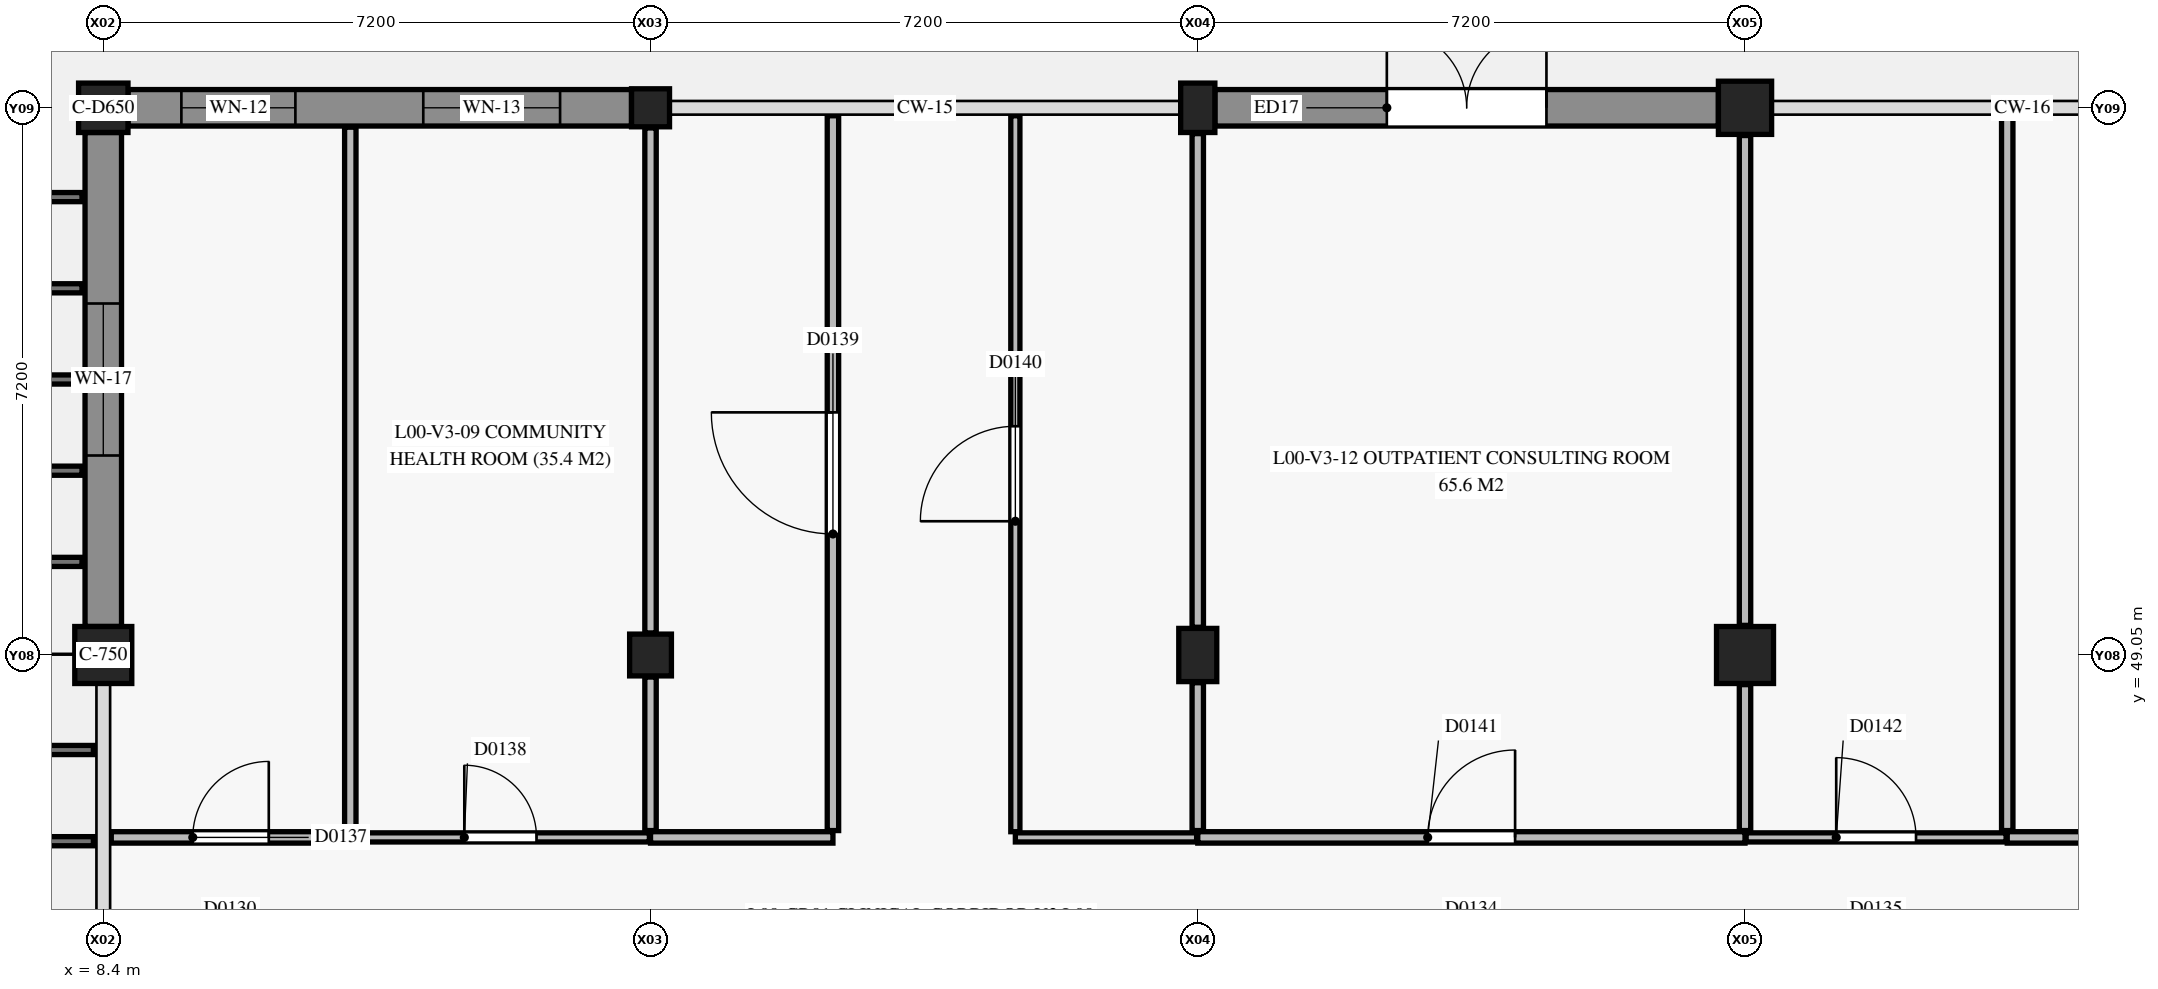
"""IFC4 building model, lengths in metres.
Left out: names, types, materials, properties, quantities, classifications, styles, units other than length and angle.
Written with IfcOpenShell. Run it as: python <this file> out.ifc"""

import sys

from ifc_helpers import new_model, si_unit, direction, frame, frame_2d, origin, origin_2d, place, context, subcontext, project, spatial, rectangle, circle, extrude, element, fill, save


model = new_model("IFC4")
c1 = context("Model", 3, precision=1e-05, world=origin(), true_north=direction((0.0, 1.0)))
c2 = subcontext(c1, "Body", "Model", "MODEL_VIEW")
j1 = project(units=[si_unit("LENGTHUNIT", "METRE"), si_unit("PLANEANGLEUNIT", "RADIAN")], contexts=[c1])
p1 = place(None, origin())
s1 = spatial("IfcSite", under=j1, at=p1, CompositionType="ELEMENT")
p2 = place(p1, origin())
s2 = spatial("IfcBuilding", under=s1, at=p2, CompositionType="ELEMENT")
p3 = place(p2, origin())
s3 = spatial("IfcBuildingStorey", under=s2, at=p3, CompositionType="ELEMENT", Elevation=0.0)
p4 = place(p3, frame((8.4, 49.05, 0.0), z_axis=(0.0, 0.0, 1.0), x_axis=(1.0, 0.0, 0.0)))
e1 = element("IfcColumn", 1, at=p4, inside=s3, PredefinedType="COLUMN", context=c2, shape_type="SweptSolid", body=[
    extrude(rectangle(XDim=0.75, YDim=0.75, at=origin_2d()), origin(), (0.0, 0.0, 1.0), 4.65),
])
p5 = place(p3, frame((8.4, 56.25, 0.0), z_axis=(0.0, 0.0, 1.0), x_axis=(1.0, 0.0, 0.0)))
e2 = element("IfcColumn", 2, at=p5, inside=s3, PredefinedType="COLUMN", context=c2, shape_type="SweptSolid", body=[
    extrude(circle(Radius=0.325, at=origin_2d()), origin(), (0.0, 0.0, 1.0), 4.96),
])
p6 = place(p3, frame((15.6, 49.05, 0.0), z_axis=(0.0, 0.0, 1.0), x_axis=(1.0, 0.0, 0.0)))
e3 = element("IfcColumn", 3, at=p6, inside=s3, PredefinedType="COLUMN", context=c2, shape_type="SweptSolid", body=[
    extrude(rectangle(XDim=0.55, YDim=0.55, at=origin_2d()), origin(), (0.0, 0.0, 1.0), 4.65),
])
p7 = place(p3, frame((15.6, 56.25, 0.0), z_axis=(0.0, 0.0, 1.0), x_axis=(1.0, 0.0, 0.0)))
e4 = element("IfcColumn", 4, at=p7, inside=s3, PredefinedType="COLUMN", context=c2, shape_type="SweptSolid", body=[
    extrude(rectangle(XDim=0.5, YDim=0.5, at=origin_2d()), origin(), (0.0, 0.0, 1.0), 4.96),
])
p8 = place(p3, frame((22.8, 49.05, 0.0), z_axis=(0.0, 0.0, 1.0), x_axis=(1.0, 0.0, 0.0)))
e5 = element("IfcColumn", 5, at=p8, inside=s3, PredefinedType="COLUMN", context=c2, shape_type="SweptSolid", body=[
    extrude(rectangle(XDim=0.5, YDim=0.7, at=origin_2d()), origin(), (0.0, 0.0, 1.0), 4.65),
])
p9 = place(p3, frame((22.8, 56.25, 0.0), z_axis=(0.0, 0.0, 1.0), x_axis=(1.0, 0.0, 0.0)))
e6 = element("IfcColumn", 6, at=p9, inside=s3, PredefinedType="COLUMN", context=c2, shape_type="SweptSolid", body=[
    extrude(rectangle(XDim=0.45, YDim=0.65, at=origin_2d()), origin(), (0.0, 0.0, 1.0), 4.96),
])
p10 = place(p3, frame((30.0, 49.05, 0.0), z_axis=(0.0, 0.0, 1.0), x_axis=(1.0, 0.0, 0.0)))
e7 = element("IfcColumn", 7, at=p10, inside=s3, PredefinedType="COLUMN", context=c2, shape_type="SweptSolid", body=[
    extrude(rectangle(XDim=0.75, YDim=0.75, at=origin_2d()), origin(), (0.0, 0.0, 1.0), 4.65),
])
p11 = place(p3, frame((30.0, 56.25, 0.0), z_axis=(0.0, 0.0, 1.0), x_axis=(1.0, 0.0, 0.0)))
e8 = element("IfcColumn", 8, at=p11, inside=s3, PredefinedType="COLUMN", context=c2, shape_type="SweptSolid", body=[
    extrude(rectangle(XDim=0.7, YDim=0.7, at=origin_2d()), origin(), (0.0, 0.0, 1.0), 4.96),
])
p12 = place(p3, frame((8.4, 49.425, 0.0), z_axis=(0.0, 0.0, 1.0), x_axis=(0.0, 1.0, 0.0)))
e9 = element("IfcWall", 9, at=p12, inside=s3, PredefinedType="SOLIDWALL", context=c2, shape_type="SweptSolid", body=[
    extrude(rectangle(XDim=6.5, YDim=0.48, at=frame_2d((3.25, 0.0))), origin(), (0.0, 0.0, 1.0), 3.98),
])
p13 = place(p12, frame((2.25, 0.0, 0.6)))
e10 = element("IfcOpeningElement", 10, at=p13, cuts=e9, PredefinedType="OPENING", context=c2, shape_type="SweptSolid", body=[
    extrude(rectangle(XDim=2.0, YDim=2.2, at=frame_2d((1.0, 1.1))), frame((0.0, 0.25, 0.0), z_axis=(0.0, -1.0, 0.0), x_axis=(1.0, 0.0, 0.0)), (0.0, 0.0, 1.0), 0.5),
])
p14 = place(p3, frame((8.725, 56.25, 0.0), z_axis=(0.0, 0.0, 1.0), x_axis=(1.0, 0.0, 0.0)))
e11 = element("IfcWall", 11, at=p14, inside=s3, PredefinedType="SOLIDWALL", context=c2, shape_type="SweptSolid", body=[
    extrude(rectangle(XDim=6.625, YDim=0.48, at=frame_2d((3.312, 0.0))), origin(), (0.0, 0.0, 1.0), 3.9),
])
p15 = place(p14, frame((0.702, 0.0, 0.9)))
e12 = element("IfcOpeningElement", 12, at=p15, cuts=e11, PredefinedType="OPENING", context=c2, shape_type="SweptSolid", body=[
    extrude(rectangle(XDim=1.5, YDim=1.5, at=frame_2d((0.75, 0.75))), frame((0.0, 0.25, 0.0), z_axis=(0.0, -1.0, 0.0), x_axis=(1.0, 0.0, 0.0)), (0.0, 0.0, 1.0), 0.5),
])
p16 = place(p14, frame((3.885, 0.0, 0.9)))
e13 = element("IfcOpeningElement", 13, at=p16, cuts=e11, PredefinedType="OPENING", context=c2, shape_type="SweptSolid", body=[
    extrude(rectangle(XDim=1.8, YDim=1.5, at=frame_2d((0.9, 0.75))), frame((0.0, 0.25, 0.0), z_axis=(0.0, -1.0, 0.0), x_axis=(1.0, 0.0, 0.0)), (0.0, 0.0, 1.0), 0.5),
])
p17 = place(p3, frame((23.025, 56.25, 0.0), z_axis=(0.0, 0.0, 1.0), x_axis=(1.0, 0.0, 0.0)))
e14 = element("IfcWall", 14, at=p17, inside=s3, PredefinedType="SOLIDWALL", context=c2, shape_type="SweptSolid", body=[
    extrude(rectangle(XDim=6.625, YDim=0.48, at=frame_2d((3.312, 0.0))), origin(), (0.0, 0.0, 1.0), 3.98),
])
p18 = place(p17, frame((2.262, 0.0, 0.0)))
e15 = element("IfcOpeningElement", 15, at=p18, cuts=e14, PredefinedType="OPENING", context=c2, shape_type="SweptSolid", body=[
    extrude(rectangle(XDim=2.1, YDim=2.4, at=frame_2d((1.05, 1.2))), frame((0.0, 0.25, 0.0), z_axis=(0.0, -1.0, 0.0), x_axis=(1.0, 0.0, 0.0)), (0.0, 0.0, 1.0), 0.5),
])
p19 = place(p3, frame((8.505, 46.65, 0.0), z_axis=(0.0, 0.0, 1.0), x_axis=(1.0, 0.0, 0.0)))
e16 = element("IfcWall", 16, at=p19, inside=s3, PredefinedType="PARTITIONING", context=c2, shape_type="SweptSolid", body=[
    extrude(rectangle(XDim=3.145, YDim=0.15, at=frame_2d((1.573, 0.0))), origin(), (0.0, 0.0, 1.0), 4.55),
])
p20 = place(p19, frame((1.073, 0.0, 0.0)))
e17 = element("IfcOpeningElement", 17, at=p20, cuts=e16, PredefinedType="OPENING", context=c2, shape_type="SweptSolid", body=[
    extrude(rectangle(XDim=1.0, YDim=2.15, at=frame_2d((0.5, 1.075))), frame((0.0, 0.085, 0.0), z_axis=(0.0, -1.0, 0.0), x_axis=(1.0, 0.0, 0.0)), (0.0, 0.0, 1.0), 0.17),
])
p21 = place(p3, frame((15.6, 46.65, 0.0), z_axis=(0.0, 0.0, 1.0), x_axis=(1.0, 0.0, 0.0)))
e18 = element("IfcWall", 18, at=p21, inside=s3, PredefinedType="PARTITIONING", context=c2, shape_type="SweptSolid", body=[
    extrude(rectangle(XDim=2.4, YDim=0.15, at=frame_2d((1.2, 0.0))), origin(), (0.0, 0.0, 1.0), 4.55),
])
p22 = place(p3, frame((18.0, 46.74, 0.0), z_axis=(0.0, 0.0, 1.0), x_axis=(0.0, 1.0, 0.0)))
e19 = element("IfcWall", 19, at=p22, inside=s3, PredefinedType="PARTITIONING", context=c2, shape_type="SweptSolid", body=[
    extrude(rectangle(XDim=9.405, YDim=0.15, at=frame_2d((4.703, 0.0))), origin(), (0.0, 0.0, 1.0), 3.82),
])
p23 = place(p22, frame((3.903, 0.0, 0.0)))
e20 = element("IfcOpeningElement", 20, at=p23, cuts=e19, PredefinedType="OPENING", context=c2, shape_type="SweptSolid", body=[
    extrude(rectangle(XDim=1.6, YDim=2.25, at=frame_2d((0.8, 1.125))), frame((0.0, 0.085, 0.0), z_axis=(0.0, -1.0, 0.0), x_axis=(1.0, 0.0, 0.0)), (0.0, 0.0, 1.0), 0.17),
])
p24 = place(p3, frame((22.8, 46.65, 0.0), z_axis=(0.0, 0.0, 1.0), x_axis=(1.0, 0.0, 0.0)))
e21 = element("IfcWall", 21, at=p24, inside=s3, PredefinedType="PARTITIONING", context=c2, shape_type="SweptSolid", body=[
    extrude(rectangle(XDim=7.2, YDim=0.15, at=frame_2d((3.6, 0.0))), origin(), (0.0, 0.0, 1.0), 4.55),
])
p25 = place(p24, frame((3.025, 0.0, 0.0)))
e22 = element("IfcOpeningElement", 22, at=p25, cuts=e21, PredefinedType="OPENING", context=c2, shape_type="SweptSolid", body=[
    extrude(rectangle(XDim=1.15, YDim=2.15, at=frame_2d((0.575, 1.075))), frame((0.0, 0.085, 0.0), z_axis=(0.0, -1.0, 0.0), x_axis=(1.0, 0.0, 0.0)), (0.0, 0.0, 1.0), 0.17),
])
p26 = place(p3, frame((33.45, 46.65, 0.0), z_axis=(0.0, 0.0, 1.0), x_axis=(1.0, 0.0, 0.0)))
e23 = element("IfcWall", 23, at=p26, inside=s3, PredefinedType="PARTITIONING", context=c2, shape_type="SweptSolid", body=[
    extrude(rectangle(XDim=3.645, YDim=0.15, at=frame_2d((1.823, 0.0))), origin(), (0.0, 0.0, 1.0), 4.55),
])
p27 = place(p26, frame((1.323, 0.0, 0.0)))
e24 = element("IfcOpeningElement", 24, at=p27, cuts=e23, PredefinedType="OPENING", context=c2, shape_type="SweptSolid", body=[
    extrude(rectangle(XDim=1.0, YDim=2.15, at=frame_2d((0.5, 1.075))), frame((0.0, 0.085, 0.0), z_axis=(0.0, -1.0, 0.0), x_axis=(1.0, 0.0, 0.0)), (0.0, 0.0, 1.0), 0.17),
])
p28 = place(p3, frame((11.665, 46.65, 0.0), z_axis=(0.0, 0.0, 1.0), x_axis=(1.0, 0.0, 0.0)))
e25 = element("IfcWall", 25, at=p28, inside=s3, PredefinedType="PARTITIONING", context=c2, shape_type="SweptSolid", body=[
    extrude(rectangle(XDim=3.92, YDim=0.12, at=frame_2d((1.96, 0.0))), origin(), (0.0, 0.0, 1.0), 4.55),
])
p29 = place(p28, frame((1.485, 0.0, 0.0)))
e26 = element("IfcOpeningElement", 26, at=p29, cuts=e25, PredefinedType="OPENING", context=c2, shape_type="SweptSolid", body=[
    extrude(rectangle(XDim=0.95, YDim=2.1, at=frame_2d((0.475, 1.05))), frame((0.0, 0.07, 0.0), z_axis=(0.0, -1.0, 0.0), x_axis=(1.0, 0.0, 0.0)), (0.0, 0.0, 1.0), 0.14),
])
p30 = place(p3, frame((20.4, 46.65, 0.0), z_axis=(0.0, 0.0, 1.0), x_axis=(1.0, 0.0, 0.0)))
e27 = element("IfcWall", 27, at=p30, inside=s3, PredefinedType="PARTITIONING", context=c2, shape_type="SweptSolid", body=[
    extrude(rectangle(XDim=2.385, YDim=0.12, at=frame_2d((1.192, 0.0))), origin(), (0.0, 0.0, 1.0), 4.55),
])
p31 = place(p3, frame((20.4, 46.725, 0.0), z_axis=(0.0, 0.0, 1.0), x_axis=(0.0, 1.0, 0.0)))
e28 = element("IfcWall", 28, at=p31, inside=s3, PredefinedType="PARTITIONING", context=c2, shape_type="SweptSolid", body=[
    extrude(rectangle(XDim=9.42, YDim=0.12, at=frame_2d((4.71, 0.0))), origin(), (0.0, 0.0, 1.0), 3.82),
])
p32 = place(p31, frame((4.085, 0.0, 0.0)))
e29 = element("IfcOpeningElement", 29, at=p32, cuts=e28, PredefinedType="OPENING", context=c2, shape_type="SweptSolid", body=[
    extrude(rectangle(XDim=1.25, YDim=2.15, at=frame_2d((0.625, 1.075))), frame((0.0, 0.07, 0.0), z_axis=(0.0, -1.0, 0.0), x_axis=(1.0, 0.0, 0.0)), (0.0, 0.0, 1.0), 0.14),
])
p33 = place(p3, frame((30.015, 46.65, 0.0), z_axis=(0.0, 0.0, 1.0), x_axis=(1.0, 0.0, 0.0)))
e30 = element("IfcWall", 30, at=p33, inside=s3, PredefinedType="PARTITIONING", context=c2, shape_type="SweptSolid", body=[
    extrude(rectangle(XDim=3.42, YDim=0.12, at=frame_2d((1.71, 0.0))), origin(), (0.0, 0.0, 1.0), 4.55),
])
p34 = place(p33, frame((1.185, 0.0, 0.0)))
e31 = element("IfcOpeningElement", 31, at=p34, cuts=e30, PredefinedType="OPENING", context=c2, shape_type="SweptSolid", body=[
    extrude(rectangle(XDim=1.05, YDim=2.15, at=frame_2d((0.525, 1.075))), frame((0.0, 0.07, 0.0), z_axis=(0.0, -1.0, 0.0), x_axis=(1.0, 0.0, 0.0)), (0.0, 0.0, 1.0), 0.14),
])
p35 = place(p3, frame((11.65, 46.74, 0.0), z_axis=(0.0, 0.0, 1.0), x_axis=(0.0, 1.0, 0.0)))
e32 = element("IfcWall", 32, at=p35, inside=s3, PredefinedType="PARTITIONING", context=c2, shape_type="SweptSolid", body=[
    extrude(rectangle(XDim=9.255, YDim=0.15, at=frame_2d((4.627, 0.0))), origin(), (0.0, 0.0, 1.0), 4.07),
])
p36 = place(p3, frame((15.6, 46.74, 0.0), z_axis=(0.0, 0.0, 1.0), x_axis=(0.0, 1.0, 0.0)))
e33 = element("IfcWall", 33, at=p36, inside=s3, PredefinedType="PARTITIONING", context=c2, shape_type="SweptSolid", body=[
    extrude(rectangle(XDim=2.02, YDim=0.15, at=frame_2d((1.01, 0.0))), origin(), (0.0, 0.0, 1.0), 4.55),
])
p37 = place(p3, frame((15.6, 49.34, 0.0), z_axis=(0.0, 0.0, 1.0), x_axis=(0.0, 1.0, 0.0)))
e34 = element("IfcWall", 34, at=p37, inside=s3, PredefinedType="PARTITIONING", context=c2, shape_type="SweptSolid", body=[
    extrude(rectangle(XDim=6.645, YDim=0.15, at=frame_2d((3.323, 0.0))), origin(), (0.0, 0.0, 1.0), 4.55),
])
p38 = place(p3, frame((22.8, 46.74, 0.0), z_axis=(0.0, 0.0, 1.0), x_axis=(0.0, 1.0, 0.0)))
e35 = element("IfcWall", 35, at=p38, inside=s3, PredefinedType="PARTITIONING", context=c2, shape_type="SweptSolid", body=[
    extrude(rectangle(XDim=1.945, YDim=0.15, at=frame_2d((0.973, 0.0))), origin(), (0.0, 0.0, 1.0), 4.55),
])
p39 = place(p3, frame((22.8, 49.415, 0.0), z_axis=(0.0, 0.0, 1.0), x_axis=(0.0, 1.0, 0.0)))
e36 = element("IfcWall", 36, at=p39, inside=s3, PredefinedType="PARTITIONING", context=c2, shape_type="SweptSolid", body=[
    extrude(rectangle(XDim=6.495, YDim=0.15, at=frame_2d((3.248, 0.0))), origin(), (0.0, 0.0, 1.0), 4.55),
])
p40 = place(p3, frame((30.0, 46.74, 0.0), z_axis=(0.0, 0.0, 1.0), x_axis=(0.0, 1.0, 0.0)))
e37 = element("IfcWall", 37, at=p40, inside=s3, PredefinedType="PARTITIONING", context=c2, shape_type="SweptSolid", body=[
    extrude(rectangle(XDim=1.92, YDim=0.15, at=frame_2d((0.96, 0.0))), origin(), (0.0, 0.0, 1.0), 4.55),
])
p41 = place(p3, frame((30.0, 49.44, 0.0), z_axis=(0.0, 0.0, 1.0), x_axis=(0.0, 1.0, 0.0)))
e38 = element("IfcWall", 38, at=p41, inside=s3, PredefinedType="PARTITIONING", context=c2, shape_type="SweptSolid", body=[
    extrude(rectangle(XDim=6.445, YDim=0.15, at=frame_2d((3.223, 0.0))), origin(), (0.0, 0.0, 1.0), 4.55),
])
p42 = place(p3, frame((33.45, 46.74, 0.0), z_axis=(0.0, 0.0, 1.0), x_axis=(0.0, 1.0, 0.0)))
e39 = element("IfcWall", 39, at=p42, inside=s3, PredefinedType="PARTITIONING", context=c2, shape_type="SweptSolid", body=[
    extrude(rectangle(XDim=9.405, YDim=0.15, at=frame_2d((4.703, 0.0))), origin(), (0.0, 0.0, 1.0), 4.04),
])
p43 = place(p13, origin())
e40 = element("IfcWindow", 40, at=p43, inside=s3, PartitioningType="SINGLE_PANEL", PredefinedType="WINDOW", context=c2, shape_type="SweptSolid", body=[
    extrude(rectangle(XDim=2.0, YDim=2.2, at=frame_2d((1.0, 1.1))), frame((0.0, 0.03, 0.0), z_axis=(0.0, -1.0, 0.0), x_axis=(1.0, 0.0, 0.0)), (0.0, 0.0, 1.0), 0.06),
])
fill(e10, e40)
p44 = place(p15, origin())
e41 = element("IfcWindow", 41, at=p44, inside=s3, PartitioningType="SINGLE_PANEL", PredefinedType="WINDOW", context=c2, shape_type="SweptSolid", body=[
    extrude(rectangle(XDim=1.5, YDim=1.5, at=frame_2d((0.75, 0.75))), frame((0.0, 0.03, 0.0), z_axis=(0.0, -1.0, 0.0), x_axis=(1.0, 0.0, 0.0)), (0.0, 0.0, 1.0), 0.06),
])
fill(e12, e41)
p45 = place(p16, origin())
e42 = element("IfcWindow", 42, at=p45, inside=s3, PartitioningType="SINGLE_PANEL", PredefinedType="WINDOW", context=c2, shape_type="SweptSolid", body=[
    extrude(rectangle(XDim=1.8, YDim=1.5, at=frame_2d((0.9, 0.75))), frame((0.0, 0.03, 0.0), z_axis=(0.0, -1.0, 0.0), x_axis=(1.0, 0.0, 0.0)), (0.0, 0.0, 1.0), 0.06),
])
fill(e13, e42)
p46 = place(p18, origin())
e43 = element("IfcDoor", 43, at=p46, inside=s3, OperationType="DOUBLE_DOOR_SINGLE_SWING", PredefinedType="DOOR", context=c2, shape_type="SweptSolid", body=[
    extrude(rectangle(XDim=2.1, YDim=2.4, at=frame_2d((1.05, 1.2))), frame((0.0, 0.025, 0.0), z_axis=(0.0, -1.0, 0.0), x_axis=(1.0, 0.0, 0.0)), (0.0, 0.0, 1.0), 0.05),
])
fill(e15, e43)
p47 = place(p20, origin())
e44 = element("IfcDoor", 44, at=p47, inside=s3, OperationType="SINGLE_SWING_RIGHT", PredefinedType="DOOR", context=c2, shape_type="SweptSolid", body=[
    extrude(rectangle(XDim=1.0, YDim=2.15, at=frame_2d((0.5, 1.075))), frame((0.0, 0.025, 0.0), z_axis=(0.0, -1.0, 0.0), x_axis=(1.0, 0.0, 0.0)), (0.0, 0.0, 1.0), 0.05),
])
fill(e17, e44)
p48 = place(p29, origin())
e45 = element("IfcDoor", 45, at=p48, inside=s3, OperationType="SINGLE_SWING_LEFT", PredefinedType="DOOR", context=c2, shape_type="SweptSolid", body=[
    extrude(rectangle(XDim=0.95, YDim=2.1, at=frame_2d((0.475, 1.05))), frame((0.0, 0.025, 0.0), z_axis=(0.0, -1.0, 0.0), x_axis=(1.0, 0.0, 0.0)), (0.0, 0.0, 1.0), 0.05),
])
fill(e26, e45)
p49 = place(p23, origin())
e46 = element("IfcDoor", 46, at=p49, inside=s3, OperationType="SINGLE_SWING_RIGHT", PredefinedType="DOOR", context=c2, shape_type="SweptSolid", body=[
    extrude(rectangle(XDim=1.6, YDim=2.25, at=frame_2d((0.8, 1.125))), frame((0.0, 0.025, 0.0), z_axis=(0.0, -1.0, 0.0), x_axis=(1.0, 0.0, 0.0)), (0.0, 0.0, 1.0), 0.05),
])
fill(e20, e46)
p50 = place(p32, origin())
e47 = element("IfcDoor", 47, at=p50, inside=s3, OperationType="SINGLE_SWING_LEFT", PredefinedType="DOOR", context=c2, shape_type="SweptSolid", body=[
    extrude(rectangle(XDim=1.25, YDim=2.15, at=frame_2d((0.625, 1.075))), frame((0.0, 0.025, 0.0), z_axis=(0.0, -1.0, 0.0), x_axis=(1.0, 0.0, 0.0)), (0.0, 0.0, 1.0), 0.05),
])
fill(e29, e47)
p51 = place(p25, origin())
e48 = element("IfcDoor", 48, at=p51, inside=s3, OperationType="SINGLE_SWING_RIGHT", PredefinedType="DOOR", context=c2, shape_type="SweptSolid", body=[
    extrude(rectangle(XDim=1.15, YDim=2.15, at=frame_2d((0.575, 1.075))), frame((0.0, 0.025, 0.0), z_axis=(0.0, -1.0, 0.0), x_axis=(1.0, 0.0, 0.0)), (0.0, 0.0, 1.0), 0.05),
])
fill(e22, e48)
p52 = place(p34, origin())
e49 = element("IfcDoor", 49, at=p52, inside=s3, OperationType="SINGLE_SWING_LEFT", PredefinedType="DOOR", context=c2, shape_type="SweptSolid", body=[
    extrude(rectangle(XDim=1.05, YDim=2.15, at=frame_2d((0.525, 1.075))), frame((0.0, 0.025, 0.0), z_axis=(0.0, -1.0, 0.0), x_axis=(1.0, 0.0, 0.0)), (0.0, 0.0, 1.0), 0.05),
])
fill(e31, e49)
save(model, sys.argv[1])
